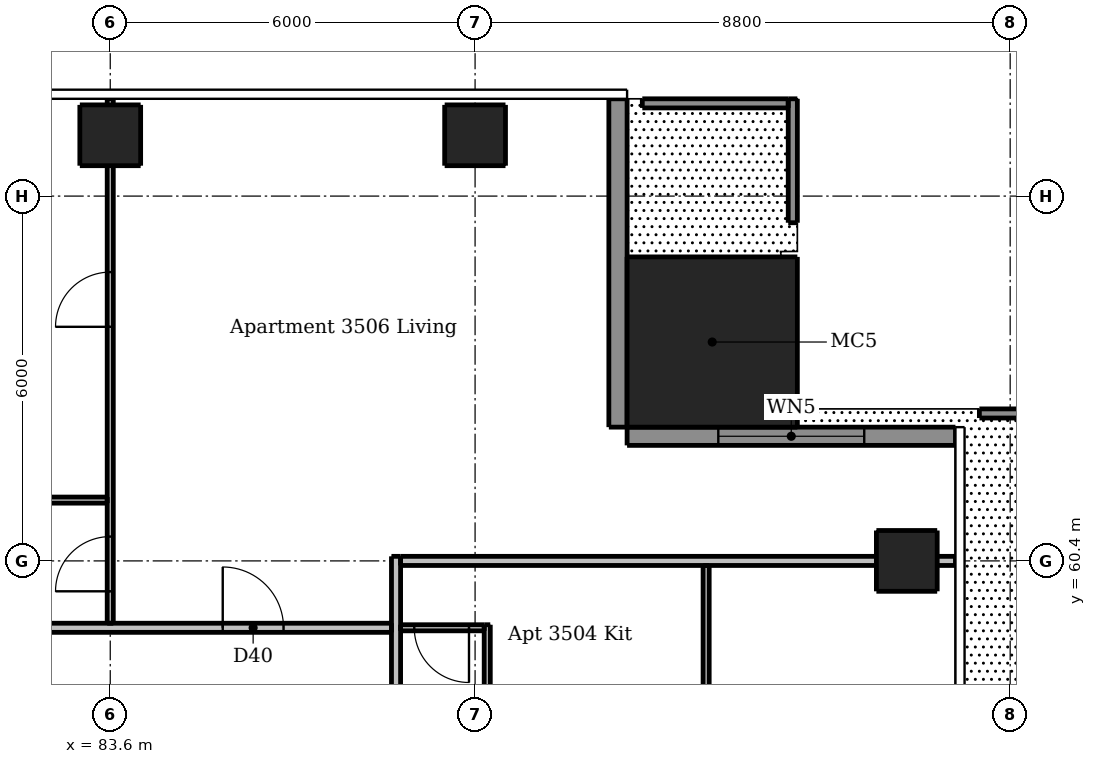
"""IFC4 building model, lengths in metres.
Left out: names, types, materials, properties, quantities, classifications, styles, units other than length and angle.
Written with IfcOpenShell. Run it as: python <this file> out.ifc"""

import sys

from ifc_helpers import new_model, si_unit, direction, frame, frame_2d, origin, origin_2d, place, context, subcontext, project, spatial, rectangle, extrude, element, fill, save


model = new_model("IFC4")
c1 = context("Model", 3, precision=1e-05, world=origin(), true_north=direction((0.0, 1.0)))
c2 = subcontext(c1, "Body", "Model", "MODEL_VIEW")
j1 = project(units=[si_unit("LENGTHUNIT", "METRE"), si_unit("PLANEANGLEUNIT", "RADIAN")], contexts=[c1])
p1 = place(None, origin())
s1 = spatial("IfcSite", under=j1, at=p1, CompositionType="ELEMENT")
p2 = place(p1, origin())
s2 = spatial("IfcBuilding", under=s1, at=p2, CompositionType="ELEMENT")
p3 = place(p2, frame((0.0, 0.0, 133.9)))
s3 = spatial("IfcBuildingStorey", under=s2, at=p3, CompositionType="ELEMENT", Elevation=133.9)
for number, where, z_axis, x_axis in (
    (1, (96.7, 60.4, 0.0), (0.0, 0.0, 1.0), (1.0, 0.0, 0.0)),
    (2, (83.6, 67.4, 0.0), (0.0, 0.0, 1.0), (1.0, 0.0, 0.0)),
    (3, (89.6, 67.4, 0.0), (0.0, 0.0, 1.0), (1.0, 0.0, 0.0)),
):
    element("IfcColumn", number, at=place(p3, frame(where, z_axis=z_axis, x_axis=x_axis)), inside=s3, PredefinedType="COLUMN", context=c2, shape_type="SweptSolid", body=[
        extrude(rectangle(XDim=1.0, YDim=1.0, at=origin_2d()), origin(), (0.0, 0.0, 1.0), 3.05),
    ])
p4 = place(p3, frame((93.5, 64.0, 0.0), z_axis=(0.0, 0.0, 1.0), x_axis=(1.0, 0.0, 0.0)))
e4 = element("IfcColumn", 4, at=p4, inside=s3, PredefinedType="COLUMN", context=c2, shape_type="SweptSolid", body=[
    extrude(rectangle(XDim=2.8, YDim=2.8, at=origin_2d()), origin(), (0.0, 0.0, 1.0), 3.3),
])
p5 = place(p3, frame((97.5, 62.45, 0.0), z_axis=(0.0, 0.0, 1.0), x_axis=(-1.0, 0.0, 0.0)))
e5 = element("IfcWall", 5, at=p5, inside=s3, PredefinedType="SOLIDWALL", context=c2, shape_type="SweptSolid", body=[
    extrude(rectangle(XDim=5.4, YDim=0.3, at=frame_2d((2.7, 0.0))), origin(), (0.0, 0.0, 1.0), 3.05),
])
p6 = place(p5, frame((1.5, 0.0, 0.15)))
e6 = element("IfcOpeningElement", 6, at=p6, cuts=e5, PredefinedType="OPENING", context=c2, shape_type="SweptSolid", body=[
    extrude(rectangle(XDim=2.4, YDim=2.1, at=frame_2d((1.2, 1.05))), frame((0.0, 0.16, 0.0), z_axis=(0.0, -1.0, 0.0), x_axis=(1.0, 0.0, 0.0)), (0.0, 0.0, 1.0), 0.32),
])
p7 = place(p3, frame((91.95, 62.6, 0.0), z_axis=(0.0, 0.0, 1.0), x_axis=(0.0, 1.0, 0.0)))
e7 = element("IfcWall", 7, at=p7, inside=s3, PredefinedType="SOLIDWALL", context=c2, shape_type="SweptSolid", body=[
    extrude(rectangle(XDim=5.4, YDim=0.3, at=frame_2d((2.7, 0.0))), origin(), (0.0, 0.0, 1.0), 3.05),
])
p8 = place(p3, frame((99.85, 62.825, 0.0), z_axis=(0.0, 0.0, 1.0), x_axis=(-1.0, 0.0, 0.0)))
e8 = element("IfcWall", 8, at=p8, inside=s3, PredefinedType="PARAPET", context=c2, shape_type="SweptSolid", body=[
    extrude(rectangle(XDim=1.956, YDim=0.15, at=frame_2d((0.978, 0.0))), origin(), (0.0, 0.0, 1.0), 1.1),
])
p9 = place(p3, frame((94.825, 65.962, 0.0), z_axis=(0.0, 0.0, 1.0), x_axis=(0.0, 1.0, 0.0)))
e9 = element("IfcWall", 9, at=p9, inside=s3, PredefinedType="PARAPET", context=c2, shape_type="SweptSolid", body=[
    extrude(rectangle(XDim=2.038, YDim=0.15, at=frame_2d((1.019, 0.0))), origin(), (0.0, 0.0, 1.0), 1.1),
])
p10 = place(p3, frame((94.75, 67.925, 0.0), z_axis=(0.0, 0.0, 1.0), x_axis=(-1.0, 0.0, 0.0)))
e10 = element("IfcWall", 10, at=p10, inside=s3, PredefinedType="PARAPET", context=c2, shape_type="SweptSolid", body=[
    extrude(rectangle(XDim=2.4, YDim=0.15, at=frame_2d((1.2, 0.0))), origin(), (0.0, 0.0, 1.0), 1.1),
])
p11 = place(p3, frame((83.6, 59.375, 0.0), z_axis=(0.0, 0.0, 1.0), x_axis=(0.0, 1.0, 0.0)))
e11 = element("IfcWall", 11, at=p11, inside=s3, PredefinedType="PARTITIONING", context=c2, shape_type="SweptSolid", body=[
    extrude(rectangle(XDim=8.625, YDim=0.1, at=frame_2d((4.312, 0.0))), origin(), (0.0, 0.0, 1.0), 2.516),
])
p12 = place(p11, frame((0.525, 0.0, 0.0)))
e12 = element("IfcOpeningElement", 12, at=p12, cuts=e11, PredefinedType="OPENING", context=c2, shape_type="SweptSolid", body=[
    extrude(rectangle(XDim=0.9, YDim=2.1, at=frame_2d((0.45, 1.05))), frame((0.0, 0.06, 0.0), z_axis=(0.0, -1.0, 0.0), x_axis=(1.0, 0.0, 0.0)), (0.0, 0.0, 1.0), 0.12),
])
p13 = place(p11, frame((4.875, 0.0, 0.0)))
e13 = element("IfcOpeningElement", 13, at=p13, cuts=e11, PredefinedType="OPENING", context=c2, shape_type="SweptSolid", body=[
    extrude(rectangle(XDim=0.9, YDim=2.1, at=frame_2d((0.45, 1.05))), frame((0.0, 0.06, 0.0), z_axis=(0.0, -1.0, 0.0), x_axis=(1.0, 0.0, 0.0)), (0.0, 0.0, 1.0), 0.12),
])
p14 = place(p3, frame((89.8, 59.35, 0.0), z_axis=(0.0, 0.0, 1.0), x_axis=(0.0, -1.0, 0.0)))
e14 = element("IfcWall", 14, at=p14, inside=s3, PredefinedType="PARTITIONING", context=c2, shape_type="SweptSolid", body=[
    extrude(rectangle(XDim=19.775, YDim=0.1, at=frame_2d((9.888, 0.0))), origin(), (0.0, 0.0, 1.0), 3.05),
])
p15 = place(p14, frame((2.7, 0.0, 0.0)))
e15 = element("IfcOpeningElement", 15, at=p15, cuts=e14, PredefinedType="OPENING", context=c2, shape_type="SweptSolid", body=[
    extrude(rectangle(XDim=0.9, YDim=2.1, at=frame_2d((0.45, 1.05))), frame((0.0, 0.06, 0.0), z_axis=(0.0, -1.0, 0.0), x_axis=(1.0, 0.0, 0.0)), (0.0, 0.0, 1.0), 0.12),
])
p16 = place(p14, frame((17.6, 0.0, 0.0)))
e16 = element("IfcOpeningElement", 16, at=p16, cuts=e14, PredefinedType="OPENING", context=c2, shape_type="SweptSolid", body=[
    extrude(rectangle(XDim=0.9, YDim=2.1, at=frame_2d((0.45, 1.05))), frame((0.0, 0.06, 0.0), z_axis=(0.0, -1.0, 0.0), x_axis=(1.0, 0.0, 0.0)), (0.0, 0.0, 1.0), 0.12),
])
p17 = place(p14, frame((10.15, 0.0, 0.0)))
e17 = element("IfcOpeningElement", 17, at=p17, cuts=e14, PredefinedType="OPENING", context=c2, shape_type="SweptSolid", body=[
    extrude(rectangle(XDim=0.9, YDim=2.1, at=frame_2d((0.45, 1.05))), frame((0.0, 0.06, 0.0), z_axis=(0.0, -1.0, 0.0), x_axis=(1.0, 0.0, 0.0)), (0.0, 0.0, 1.0), 0.12),
])
p18 = place(p14, frame((14.65, 0.0, 0.0)))
e18 = element("IfcOpeningElement", 18, at=p18, cuts=e14, PredefinedType="OPENING", context=c2, shape_type="SweptSolid", body=[
    extrude(rectangle(XDim=0.8, YDim=2.1, at=frame_2d((0.4, 1.05))), frame((0.0, 0.06, 0.0), z_axis=(0.0, -1.0, 0.0), x_axis=(1.0, 0.0, 0.0)), (0.0, 0.0, 1.0), 0.12),
])
p19 = place(p14, frame((5.75, 0.0, 0.0)))
e19 = element("IfcOpeningElement", 19, at=p19, cuts=e14, PredefinedType="OPENING", context=c2, shape_type="SweptSolid", body=[
    extrude(rectangle(XDim=0.8, YDim=2.1, at=frame_2d((0.4, 1.05))), frame((0.0, 0.06, 0.0), z_axis=(0.0, -1.0, 0.0), x_axis=(1.0, 0.0, 0.0)), (0.0, 0.0, 1.0), 0.12),
])
p20 = place(p3, frame((93.4, 57.95, 0.0), z_axis=(0.0, 0.0, 1.0), x_axis=(0.0, 1.0, 0.0)))
e20 = element("IfcWall", 20, at=p20, inside=s3, PredefinedType="PARTITIONING", context=c2, shape_type="SweptSolid", body=[
    extrude(rectangle(XDim=2.375, YDim=0.1, at=frame_2d((1.188, 0.0))), origin(), (0.0, 0.0, 1.0), 3.05),
])
p21 = place(p3, frame((83.55, 61.4, 0.0), z_axis=(0.0, 0.0, 1.0), x_axis=(-1.0, 0.0, 0.0)))
e21 = element("IfcWall", 21, at=p21, inside=s3, PredefinedType="PARTITIONING", context=c2, shape_type="SweptSolid", body=[
    extrude(rectangle(XDim=5.875, YDim=0.1, at=frame_2d((2.938, 0.0))), origin(), (0.0, 0.0, 1.0), 3.05),
])
p22 = place(p21, frame((3.75, 0.0, 0.0)))
e22 = element("IfcOpeningElement", 22, at=p22, cuts=e21, PredefinedType="OPENING", context=c2, shape_type="SweptSolid", body=[
    extrude(rectangle(XDim=0.8, YDim=2.1, at=frame_2d((0.4, 1.05))), frame((0.0, 0.06, 0.0), z_axis=(0.0, -1.0, 0.0), x_axis=(1.0, 0.0, 0.0)), (0.0, 0.0, 1.0), 0.12),
])
p23 = place(p3, frame((89.75, 59.3, 0.0), z_axis=(0.0, 0.0, 1.0), x_axis=(-1.0, 0.0, 0.0)))
e23 = element("IfcWall", 23, at=p23, inside=s3, PredefinedType="PARTITIONING", context=c2, shape_type="SweptSolid", body=[
    extrude(rectangle(XDim=1.375, YDim=0.1, at=frame_2d((0.688, 0.0))), origin(), (0.0, 0.0, 1.0), 3.05),
])
p24 = place(p23, frame((0.25, 0.0, 0.0)))
e24 = element("IfcOpeningElement", 24, at=p24, cuts=e23, PredefinedType="OPENING", context=c2, shape_type="SweptSolid", body=[
    extrude(rectangle(XDim=0.9, YDim=2.1, at=frame_2d((0.45, 1.05))), frame((0.0, 0.06, 0.0), z_axis=(0.0, -1.0, 0.0), x_axis=(1.0, 0.0, 0.0)), (0.0, 0.0, 1.0), 0.12),
])
p25 = place(p3, frame((88.3, 60.475, 0.0), z_axis=(0.0, 0.0, 1.0), x_axis=(0.0, -1.0, 0.0)))
e25 = element("IfcWall", 25, at=p25, inside=s3, PredefinedType="PARTITIONING", context=c2, shape_type="SweptSolid", body=[
    extrude(rectangle(XDim=28.7, YDim=0.15, at=frame_2d((14.35, 0.0))), origin(), (0.0, 0.0, 1.0), 3.05),
])
p26 = place(p25, frame((27.425, 0.0, 0.0)))
e26 = element("IfcOpeningElement", 26, at=p26, cuts=e25, PredefinedType="OPENING", context=c2, shape_type="SweptSolid", body=[
    extrude(rectangle(XDim=1.0, YDim=2.1, at=frame_2d((0.5, 1.05))), frame((0.0, 0.085, 0.0), z_axis=(0.0, -1.0, 0.0), x_axis=(1.0, 0.0, 0.0)), (0.0, 0.0, 1.0), 0.17),
])
p27 = place(p25, frame((10.575, 0.0, 0.0)))
e27 = element("IfcOpeningElement", 27, at=p27, cuts=e25, PredefinedType="OPENING", context=c2, shape_type="SweptSolid", body=[
    extrude(rectangle(XDim=1.0, YDim=2.1, at=frame_2d((0.5, 1.05))), frame((0.0, 0.085, 0.0), z_axis=(0.0, -1.0, 0.0), x_axis=(1.0, 0.0, 0.0)), (0.0, 0.0, 1.0), 0.17),
])
p28 = place(p3, frame((88.375, 60.4, 0.0), z_axis=(0.0, 0.0, 1.0), x_axis=(1.0, 0.0, 0.0)))
e28 = element("IfcWall", 28, at=p28, inside=s3, PredefinedType="PARTITIONING", context=c2, shape_type="SweptSolid", body=[
    extrude(rectangle(XDim=9.125, YDim=0.15, at=frame_2d((4.562, 0.0))), origin(), (0.0, 0.0, 1.0), 2.647),
])
p29 = place(p3, frame((59.675, 59.3, 0.0), z_axis=(0.0, 0.0, 1.0), x_axis=(1.0, 0.0, 0.0)))
e29 = element("IfcWall", 29, at=p29, inside=s3, PredefinedType="PARTITIONING", context=c2, shape_type="SweptSolid", body=[
    extrude(rectangle(XDim=28.55, YDim=0.15, at=frame_2d((14.275, 0.0))), origin(), (0.0, 0.0, 1.0), 3.05),
])
p30 = place(p29, frame((8.975, 0.0, 0.0)))
e30 = element("IfcOpeningElement", 30, at=p30, cuts=e29, PredefinedType="OPENING", context=c2, shape_type="SweptSolid", body=[
    extrude(rectangle(XDim=1.0, YDim=2.1, at=frame_2d((0.5, 1.05))), frame((0.0, 0.085, 0.0), z_axis=(0.0, -1.0, 0.0), x_axis=(1.0, 0.0, 0.0)), (0.0, 0.0, 1.0), 0.17),
])
p31 = place(p29, frame((25.775, 0.0, 0.0)))
e31 = element("IfcOpeningElement", 31, at=p31, cuts=e29, PredefinedType="OPENING", context=c2, shape_type="SweptSolid", body=[
    extrude(rectangle(XDim=1.0, YDim=2.1, at=frame_2d((0.5, 1.05))), frame((0.0, 0.085, 0.0), z_axis=(0.0, -1.0, 0.0), x_axis=(1.0, 0.0, 0.0)), (0.0, 0.0, 1.0), 0.17),
])
p32 = place(p6, origin())
e32 = element("IfcWindow", 32, at=p32, inside=s3, PartitioningType="DOUBLE_PANEL_VERTICAL", PredefinedType="WINDOW", context=c2, shape_type="SweptSolid", body=[
    extrude(rectangle(XDim=2.4, YDim=2.1, at=frame_2d((1.2, 1.05))), frame((0.0, 0.03, 0.0), z_axis=(0.0, -1.0, 0.0), x_axis=(1.0, 0.0, 0.0)), (0.0, 0.0, 1.0), 0.06),
])
fill(e6, e32)
p33 = place(p24, origin())
e33 = element("IfcDoor", 33, at=p33, inside=s3, OperationType="SINGLE_SWING_LEFT", PredefinedType="DOOR", context=c2, shape_type="SweptSolid", body=[
    extrude(rectangle(XDim=0.9, YDim=2.1, at=frame_2d((0.45, 1.05))), frame((0.0, 0.025, 0.0), z_axis=(0.0, -1.0, 0.0), x_axis=(1.0, 0.0, 0.0)), (0.0, 0.0, 1.0), 0.05),
])
fill(e24, e33)
p34 = place(p31, origin())
e34 = element("IfcDoor", 34, at=p34, inside=s3, OperationType="SINGLE_SWING_LEFT", PredefinedType="DOOR", context=c2, shape_type="SweptSolid", body=[
    extrude(rectangle(XDim=1.0, YDim=2.1, at=frame_2d((0.5, 1.05))), frame((0.0, 0.025, 0.0), z_axis=(0.0, -1.0, 0.0), x_axis=(1.0, 0.0, 0.0)), (0.0, 0.0, 1.0), 0.05),
])
fill(e31, e34)
p35 = place(p12, origin())
e35 = element("IfcDoor", 35, at=p35, inside=s3, OperationType="SINGLE_SWING_LEFT", PredefinedType="DOOR", context=c2, shape_type="SweptSolid", body=[
    extrude(rectangle(XDim=0.9, YDim=2.1, at=frame_2d((0.45, 1.05))), frame((0.0, 0.025, 0.0), z_axis=(0.0, -1.0, 0.0), x_axis=(1.0, 0.0, 0.0)), (0.0, 0.0, 1.0), 0.05),
])
fill(e12, e35)
p36 = place(p13, origin())
e36 = element("IfcDoor", 36, at=p36, inside=s3, OperationType="SINGLE_SWING_LEFT", PredefinedType="DOOR", context=c2, shape_type="SweptSolid", body=[
    extrude(rectangle(XDim=0.9, YDim=2.1, at=frame_2d((0.45, 1.05))), frame((0.0, 0.025, 0.0), z_axis=(0.0, -1.0, 0.0), x_axis=(1.0, 0.0, 0.0)), (0.0, 0.0, 1.0), 0.05),
])
fill(e13, e36)
save(model, sys.argv[1])
